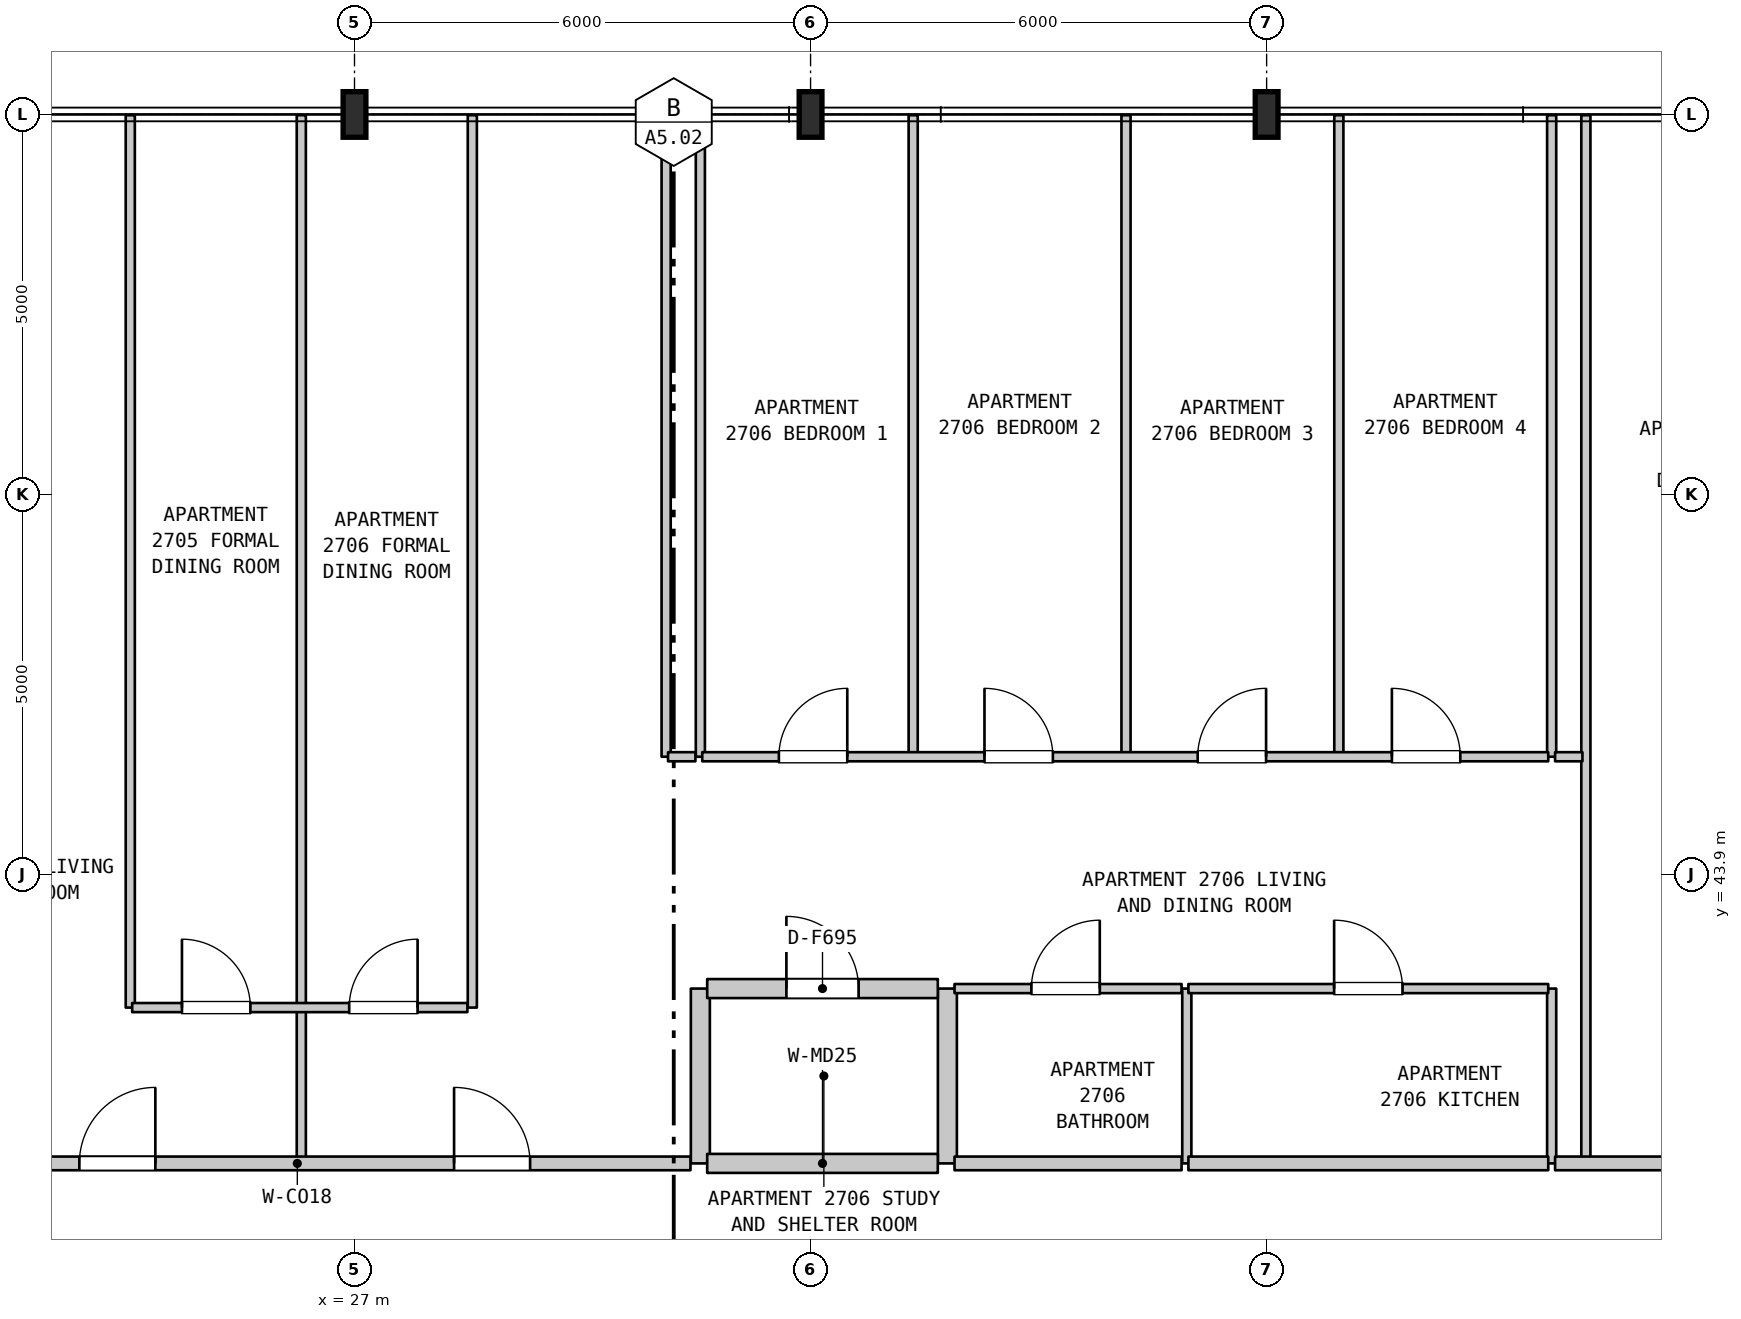
"""IFC4 building model, lengths in metres.
Left out: names, types, materials, properties, quantities, classifications, styles, units other than length and angle.
Written with IfcOpenShell. Run it as: python <this file> out.ifc"""

import sys

from ifc_helpers import new_model, si_unit, direction, frame, frame_2d, origin, origin_2d, place, context, subcontext, project, spatial, rectangle, i_section, extrude, element, fill, save


model = new_model("IFC4")
c1 = context("Model", 3, precision=1e-05, world=origin(), true_north=direction((0.0, 1.0)))
c2 = subcontext(c1, "Body", "Model", "MODEL_VIEW")
j1 = project(units=[si_unit("LENGTHUNIT", "METRE"), si_unit("PLANEANGLEUNIT", "RADIAN")], contexts=[c1])
p1 = place(None, origin())
s1 = spatial("IfcSite", under=j1, at=p1, CompositionType="ELEMENT")
p2 = place(p1, origin())
s2 = spatial("IfcBuilding", under=s1, at=p2, CompositionType="ELEMENT")
p3 = place(p2, frame((0.0, 0.0, 113.1)))
s3 = spatial("IfcBuildingStorey", under=s2, at=p3, CompositionType="ELEMENT", Elevation=113.1)
for number, where, z_axis, x_axis in (
    (1, (27.0, 53.9, 0.0), (0.0, 0.0, 1.0), (1.0, 0.0, 0.0)),
    (2, (33.0, 53.9, 0.0), (0.0, 0.0, 1.0), (1.0, 0.0, 0.0)),
    (3, (39.0, 53.9, 0.0), (0.0, 0.0, 1.0), (1.0, 0.0, 0.0)),
):
    element("IfcColumn", number, at=place(p3, frame(where, z_axis=z_axis, x_axis=x_axis)), inside=s3, PredefinedType="COLUMN", context=c2, shape_type="SweptSolid", body=[
        extrude(i_section(OverallWidth=0.3, OverallDepth=0.6, WebThickness=0.015, FlangeThickness=0.03, FilletRadius=0.027, at=origin_2d()), origin(), (0.0, 0.0, 1.0), 3.7),
    ])
p4 = place(p3, frame((24.05, 42.15, 0.0), z_axis=(0.0, 0.0, 1.0), x_axis=(0.0, 1.0, 0.0)))
e4 = element("IfcWall", 4, at=p4, inside=s3, PredefinedType="PARTITIONING", context=c2, shape_type="SweptSolid", body=[
    extrude(rectangle(XDim=11.74, YDim=0.12, at=frame_2d((5.87, 0.0))), origin(), (0.0, 0.0, 1.0), 3.385),
])
p5 = place(p3, frame((26.3, 40.1, 0.0), z_axis=(0.0, 0.0, 1.0), x_axis=(0.0, 1.0, 0.0)))
e5 = element("IfcWall", 5, at=p5, inside=s3, PredefinedType="PARTITIONING", context=c2, shape_type="SweptSolid", body=[
    extrude(rectangle(XDim=2.05, YDim=0.12, at=frame_2d((1.025, 0.0))), origin(), (0.0, 0.0, 1.0), 3.385),
])
for number, where, z_axis, x_axis in (
    (6, (26.3, 42.15, 0.0), (0.0, 0.0, 1.0), (0.0, 1.0, 0.0)),
    (7, (28.55, 42.15, 0.0), (0.0, 0.0, 1.0), (0.0, 1.0, 0.0)),
):
    element("IfcWall", number, at=place(p3, frame(where, z_axis=z_axis, x_axis=x_axis)), inside=s3, PredefinedType="PARTITIONING", context=c2, shape_type="SweptSolid", body=[
        extrude(rectangle(XDim=11.74, YDim=0.12, at=frame_2d((5.87, 0.0))), origin(), (0.0, 0.0, 1.0), 3.385),
    ])
p6 = place(p3, frame((31.1, 45.45, 0.0), z_axis=(0.0, 0.0, 1.0), x_axis=(0.0, 1.0, 0.0)))
e8 = element("IfcWall", 8, at=p6, inside=s3, PredefinedType="PARTITIONING", context=c2, shape_type="SweptSolid", body=[
    extrude(rectangle(XDim=8.44, YDim=0.12, at=frame_2d((4.22, 0.0))), origin(), (0.0, 0.0, 1.0), 3.385),
])
p7 = place(p3, frame((31.55, 40.1, 0.0), z_axis=(0.0, 0.0, 1.0), x_axis=(0.0, 1.0, 0.0)))
e9 = element("IfcWall", 9, at=p7, inside=s3, PredefinedType="STANDARD", context=c2, shape_type="SweptSolid", body=[
    extrude(rectangle(XDim=2.3, YDim=0.25, at=frame_2d((1.15, 0.0))), origin(), (0.0, 0.0, 1.0), 3.385),
])
for number, where, z_axis, x_axis in (
    (10, (31.55, 45.45, 0.0), (0.0, 0.0, 1.0), (0.0, 1.0, 0.0)),
    (11, (34.35, 45.45, 0.0), (0.0, 0.0, 1.0), (0.0, 1.0, 0.0)),
):
    element("IfcWall", number, at=place(p3, frame(where, z_axis=z_axis, x_axis=x_axis)), inside=s3, PredefinedType="PARTITIONING", context=c2, shape_type="SweptSolid", body=[
        extrude(rectangle(XDim=8.44, YDim=0.12, at=frame_2d((4.22, 0.0))), origin(), (0.0, 0.0, 1.0), 3.385),
    ])
p8 = place(p3, frame((34.8, 40.1, 0.0), z_axis=(0.0, 0.0, 1.0), x_axis=(0.0, 1.0, 0.0)))
e12 = element("IfcWall", 12, at=p8, inside=s3, PredefinedType="STANDARD", context=c2, shape_type="SweptSolid", body=[
    extrude(rectangle(XDim=2.3, YDim=0.25, at=frame_2d((1.15, 0.0))), origin(), (0.0, 0.0, 1.0), 3.385),
])
p9 = place(p3, frame((37.15, 45.45, 0.0), z_axis=(0.0, 0.0, 1.0), x_axis=(0.0, 1.0, 0.0)))
e13 = element("IfcWall", 13, at=p9, inside=s3, PredefinedType="PARTITIONING", context=c2, shape_type="SweptSolid", body=[
    extrude(rectangle(XDim=8.44, YDim=0.12, at=frame_2d((4.22, 0.0))), origin(), (0.0, 0.0, 1.0), 3.385),
])
p10 = place(p3, frame((37.95, 40.1, 0.0), z_axis=(0.0, 0.0, 1.0), x_axis=(0.0, 1.0, 0.0)))
e14 = element("IfcWall", 14, at=p10, inside=s3, PredefinedType="PARTITIONING", context=c2, shape_type="SweptSolid", body=[
    extrude(rectangle(XDim=2.3, YDim=0.12, at=frame_2d((1.15, 0.0))), origin(), (0.0, 0.0, 1.0), 3.385),
])
p11 = place(p3, frame((39.95, 45.45, 0.0), z_axis=(0.0, 0.0, 1.0), x_axis=(0.0, 1.0, 0.0)))
e15 = element("IfcWall", 15, at=p11, inside=s3, PredefinedType="PARTITIONING", context=c2, shape_type="SweptSolid", body=[
    extrude(rectangle(XDim=8.44, YDim=0.12, at=frame_2d((4.22, 0.0))), origin(), (0.0, 0.0, 1.0), 3.385),
])
p12 = place(p3, frame((42.75, 40.1, 0.0), z_axis=(0.0, 0.0, 1.0), x_axis=(0.0, 1.0, 0.0)))
e16 = element("IfcWall", 16, at=p12, inside=s3, PredefinedType="PARTITIONING", context=c2, shape_type="SweptSolid", body=[
    extrude(rectangle(XDim=2.3, YDim=0.12, at=frame_2d((1.15, 0.0))), origin(), (0.0, 0.0, 1.0), 3.385),
])
p13 = place(p3, frame((42.75, 45.45, 0.0), z_axis=(0.0, 0.0, 1.0), x_axis=(0.0, 1.0, 0.0)))
e17 = element("IfcWall", 17, at=p13, inside=s3, PredefinedType="PARTITIONING", context=c2, shape_type="SweptSolid", body=[
    extrude(rectangle(XDim=8.44, YDim=0.12, at=frame_2d((4.22, 0.0))), origin(), (0.0, 0.0, 1.0), 3.385),
])
p14 = place(p3, frame((43.2, 40.1, 0.0), z_axis=(0.0, 0.0, 1.0), x_axis=(0.0, 1.0, 0.0)))
e18 = element("IfcWall", 18, at=p14, inside=s3, PredefinedType="PARTITIONING", context=c2, shape_type="SweptSolid", body=[
    extrude(rectangle(XDim=13.79, YDim=0.12, at=frame_2d((6.895, 0.0))), origin(), (0.0, 0.0, 1.0), 3.385),
])
p15 = place(p3, frame((21.075, 40.1, 0.0), z_axis=(0.0, 0.0, 1.0), x_axis=(1.0, 0.0, 0.0)))
e19 = element("IfcWall", 19, at=p15, inside=s3, PredefinedType="STANDARD", context=c2, shape_type="SweptSolid", body=[
    extrude(rectangle(XDim=10.345, YDim=0.18, at=frame_2d((5.172, 0.0))), origin(), (0.0, 0.0, 1.0), 3.385),
])
p16 = place(p15, frame((2.305, 0.0, 0.0)))
e20 = element("IfcOpeningElement", 20, at=p16, cuts=e19, PredefinedType="OPENING", context=c2, shape_type="SweptSolid", body=[
    extrude(rectangle(XDim=1.0, YDim=2.15, at=frame_2d((0.5, 1.075))), frame((0.0, 0.1, 0.0), z_axis=(0.0, -1.0, 0.0), x_axis=(1.0, 0.0, 0.0)), (0.0, 0.0, 1.0), 0.2),
])
p17 = place(p15, frame((7.235, 0.0, 0.0)))
e21 = element("IfcOpeningElement", 21, at=p17, cuts=e19, PredefinedType="OPENING", context=c2, shape_type="SweptSolid", body=[
    extrude(rectangle(XDim=1.0, YDim=2.15, at=frame_2d((0.5, 1.075))), frame((0.0, 0.1, 0.0), z_axis=(0.0, -1.0, 0.0), x_axis=(1.0, 0.0, 0.0)), (0.0, 0.0, 1.0), 0.2),
])
p18 = place(p3, frame((31.64, 40.1, 0.0), z_axis=(0.0, 0.0, 1.0), x_axis=(1.0, 0.0, 0.0)))
e22 = element("IfcWall", 22, at=p18, inside=s3, PredefinedType="STANDARD", context=c2, shape_type="SweptSolid", body=[
    extrude(rectangle(XDim=3.034, YDim=0.25, at=frame_2d((1.517, 0.0))), origin(), (0.0, 0.0, 1.0), 3.385),
])
p19 = place(p3, frame((34.894, 40.1, 0.0), z_axis=(0.0, 0.0, 1.0), x_axis=(1.0, 0.0, 0.0)))
e23 = element("IfcWall", 23, at=p19, inside=s3, PredefinedType="STANDARD", context=c2, shape_type="SweptSolid", body=[
    extrude(rectangle(XDim=2.987, YDim=0.18, at=frame_2d((1.494, 0.0))), origin(), (0.0, 0.0, 1.0), 3.385),
])
p20 = place(p3, frame((37.971, 40.1, 0.0), z_axis=(0.0, 0.0, 1.0), x_axis=(1.0, 0.0, 0.0)))
e24 = element("IfcWall", 24, at=p20, inside=s3, PredefinedType="STANDARD", context=c2, shape_type="SweptSolid", body=[
    extrude(rectangle(XDim=4.734, YDim=0.18, at=frame_2d((2.367, 0.0))), origin(), (0.0, 0.0, 1.0), 3.385),
])
p21 = place(p3, frame((42.795, 40.1, 0.0), z_axis=(0.0, 0.0, 1.0), x_axis=(1.0, 0.0, 0.0)))
e25 = element("IfcWall", 25, at=p21, inside=s3, PredefinedType="STANDARD", context=c2, shape_type="SweptSolid", body=[
    extrude(rectangle(XDim=3.96, YDim=0.18, at=frame_2d((1.98, 0.0))), origin(), (0.0, 0.0, 1.0), 3.385),
])
p22 = place(p21, frame((1.609, 0.0, 0.0)))
e26 = element("IfcOpeningElement", 26, at=p22, cuts=e25, PredefinedType="OPENING", context=c2, shape_type="SweptSolid", body=[
    extrude(rectangle(XDim=1.0, YDim=2.15, at=frame_2d((0.5, 1.075))), frame((0.0, 0.1, 0.0), z_axis=(0.0, -1.0, 0.0), x_axis=(1.0, 0.0, 0.0)), (0.0, 0.0, 1.0), 0.2),
])
p23 = place(p3, frame((24.075, 42.15, 0.0), z_axis=(0.0, 0.0, 1.0), x_axis=(1.0, 0.0, 0.0)))
e27 = element("IfcWall", 27, at=p23, inside=s3, PredefinedType="PARTITIONING", context=c2, shape_type="SweptSolid", body=[
    extrude(rectangle(XDim=4.41, YDim=0.12, at=frame_2d((2.205, 0.0))), origin(), (0.0, 0.0, 1.0), 3.385),
])
p24 = place(p23, frame((0.655, 0.0, 0.0)))
e28 = element("IfcOpeningElement", 28, at=p24, cuts=e27, PredefinedType="OPENING", context=c2, shape_type="SweptSolid", body=[
    extrude(rectangle(XDim=0.9, YDim=2.15, at=frame_2d((0.45, 1.075))), frame((0.0, 0.07, 0.0), z_axis=(0.0, -1.0, 0.0), x_axis=(1.0, 0.0, 0.0)), (0.0, 0.0, 1.0), 0.14),
])
p25 = place(p23, frame((2.855, 0.0, 0.0)))
e29 = element("IfcOpeningElement", 29, at=p25, cuts=e27, PredefinedType="OPENING", context=c2, shape_type="SweptSolid", body=[
    extrude(rectangle(XDim=0.9, YDim=2.15, at=frame_2d((0.45, 1.075))), frame((0.0, 0.07, 0.0), z_axis=(0.0, -1.0, 0.0), x_axis=(1.0, 0.0, 0.0)), (0.0, 0.0, 1.0), 0.14),
])
p26 = place(p3, frame((31.64, 42.4, 0.0), z_axis=(0.0, 0.0, 1.0), x_axis=(1.0, 0.0, 0.0)))
e30 = element("IfcWall", 30, at=p26, inside=s3, PredefinedType="STANDARD", context=c2, shape_type="SweptSolid", body=[
    extrude(rectangle(XDim=3.034, YDim=0.25, at=frame_2d((1.517, 0.0))), origin(), (0.0, 0.0, 1.0), 3.385),
])
p27 = place(p26, frame((1.042, 0.0, 0.0)))
e31 = element("IfcOpeningElement", 31, at=p27, cuts=e30, PredefinedType="OPENING", context=c2, shape_type="SweptSolid", body=[
    extrude(rectangle(XDim=0.95, YDim=2.15, at=frame_2d((0.475, 1.075))), frame((0.0, 0.135, 0.0), z_axis=(0.0, -1.0, 0.0), x_axis=(1.0, 0.0, 0.0)), (0.0, 0.0, 1.0), 0.27),
])
p28 = place(p3, frame((34.894, 42.4, 0.0), z_axis=(0.0, 0.0, 1.0), x_axis=(1.0, 0.0, 0.0)))
e32 = element("IfcWall", 32, at=p28, inside=s3, PredefinedType="PARTITIONING", context=c2, shape_type="SweptSolid", body=[
    extrude(rectangle(XDim=2.987, YDim=0.12, at=frame_2d((1.494, 0.0))), origin(), (0.0, 0.0, 1.0), 3.385),
])
p29 = place(p28, frame((1.011, 0.0, 0.0)))
e33 = element("IfcOpeningElement", 33, at=p29, cuts=e32, PredefinedType="OPENING", context=c2, shape_type="SweptSolid", body=[
    extrude(rectangle(XDim=0.9, YDim=2.1, at=frame_2d((0.45, 1.05))), frame((0.0, 0.07, 0.0), z_axis=(0.0, -1.0, 0.0), x_axis=(1.0, 0.0, 0.0)), (0.0, 0.0, 1.0), 0.14),
])
p30 = place(p3, frame((37.971, 42.4, 0.0), z_axis=(0.0, 0.0, 1.0), x_axis=(1.0, 0.0, 0.0)))
e34 = element("IfcWall", 34, at=p30, inside=s3, PredefinedType="PARTITIONING", context=c2, shape_type="SweptSolid", body=[
    extrude(rectangle(XDim=4.734, YDim=0.12, at=frame_2d((2.367, 0.0))), origin(), (0.0, 0.0, 1.0), 3.385),
])
p31 = place(p30, frame((1.917, 0.0, 0.0)))
e35 = element("IfcOpeningElement", 35, at=p31, cuts=e34, PredefinedType="OPENING", context=c2, shape_type="SweptSolid", body=[
    extrude(rectangle(XDim=0.9, YDim=2.15, at=frame_2d((0.45, 1.075))), frame((0.0, 0.07, 0.0), z_axis=(0.0, -1.0, 0.0), x_axis=(1.0, 0.0, 0.0)), (0.0, 0.0, 1.0), 0.14),
])
p32 = place(p3, frame((31.125, 45.45, 0.0), z_axis=(0.0, 0.0, 1.0), x_axis=(1.0, 0.0, 0.0)))
e36 = element("IfcWall", 36, at=p32, inside=s3, PredefinedType="PARTITIONING", context=c2, shape_type="SweptSolid", body=[
    extrude(rectangle(XDim=0.36, YDim=0.12, at=frame_2d((0.18, 0.0))), origin(), (0.0, 0.0, 1.0), 3.385),
])
p33 = place(p3, frame((31.575, 45.45, 0.0), z_axis=(0.0, 0.0, 1.0), x_axis=(1.0, 0.0, 0.0)))
e37 = element("IfcWall", 37, at=p33, inside=s3, PredefinedType="PARTITIONING", context=c2, shape_type="SweptSolid", body=[
    extrude(rectangle(XDim=11.13, YDim=0.12, at=frame_2d((5.565, 0.0))), origin(), (0.0, 0.0, 1.0), 3.385),
])
p34 = place(p33, frame((1.008, 0.0, 0.0)))
e38 = element("IfcOpeningElement", 38, at=p34, cuts=e37, PredefinedType="OPENING", context=c2, shape_type="SweptSolid", body=[
    extrude(rectangle(XDim=0.9, YDim=2.15, at=frame_2d((0.45, 1.075))), frame((0.0, 0.07, 0.0), z_axis=(0.0, -1.0, 0.0), x_axis=(1.0, 0.0, 0.0)), (0.0, 0.0, 1.0), 0.14),
])
p35 = place(p33, frame((3.713, 0.0, 0.0)))
e39 = element("IfcOpeningElement", 39, at=p35, cuts=e37, PredefinedType="OPENING", context=c2, shape_type="SweptSolid", body=[
    extrude(rectangle(XDim=0.9, YDim=2.15, at=frame_2d((0.45, 1.075))), frame((0.0, 0.07, 0.0), z_axis=(0.0, -1.0, 0.0), x_axis=(1.0, 0.0, 0.0)), (0.0, 0.0, 1.0), 0.14),
])
p36 = place(p33, frame((6.518, 0.0, 0.0)))
e40 = element("IfcOpeningElement", 40, at=p36, cuts=e37, PredefinedType="OPENING", context=c2, shape_type="SweptSolid", body=[
    extrude(rectangle(XDim=0.9, YDim=2.15, at=frame_2d((0.45, 1.075))), frame((0.0, 0.07, 0.0), z_axis=(0.0, -1.0, 0.0), x_axis=(1.0, 0.0, 0.0)), (0.0, 0.0, 1.0), 0.14),
])
p37 = place(p33, frame((9.073, 0.0, 0.0)))
e41 = element("IfcOpeningElement", 41, at=p37, cuts=e37, PredefinedType="OPENING", context=c2, shape_type="SweptSolid", body=[
    extrude(rectangle(XDim=0.9, YDim=2.15, at=frame_2d((0.45, 1.075))), frame((0.0, 0.07, 0.0), z_axis=(0.0, -1.0, 0.0), x_axis=(1.0, 0.0, 0.0)), (0.0, 0.0, 1.0), 0.14),
])
p38 = place(p3, frame((42.795, 45.45, 0.0), z_axis=(0.0, 0.0, 1.0), x_axis=(1.0, 0.0, 0.0)))
e42 = element("IfcWall", 42, at=p38, inside=s3, PredefinedType="PARTITIONING", context=c2, shape_type="SweptSolid", body=[
    extrude(rectangle(XDim=0.36, YDim=0.12, at=frame_2d((0.18, 0.0))), origin(), (0.0, 0.0, 1.0), 3.385),
])
p39 = place(p16, origin())
e43 = element("IfcDoor", 43, at=p39, inside=s3, OperationType="SINGLE_SWING_RIGHT", PredefinedType="DOOR", context=c2, shape_type="SweptSolid", body=[
    extrude(rectangle(XDim=1.0, YDim=2.15, at=frame_2d((0.5, 1.075))), frame((0.0, 0.025, 0.0), z_axis=(0.0, -1.0, 0.0), x_axis=(1.0, 0.0, 0.0)), (0.0, 0.0, 1.0), 0.05),
])
fill(e20, e43)
p40 = place(p17, origin())
e44 = element("IfcDoor", 44, at=p40, inside=s3, OperationType="SINGLE_SWING_LEFT", PredefinedType="DOOR", context=c2, shape_type="SweptSolid", body=[
    extrude(rectangle(XDim=1.0, YDim=2.15, at=frame_2d((0.5, 1.075))), frame((0.0, 0.025, 0.0), z_axis=(0.0, -1.0, 0.0), x_axis=(1.0, 0.0, 0.0)), (0.0, 0.0, 1.0), 0.05),
])
fill(e21, e44)
p41 = place(p24, origin())
e45 = element("IfcDoor", 45, at=p41, inside=s3, OperationType="SINGLE_SWING_LEFT", PredefinedType="DOOR", context=c2, shape_type="SweptSolid", body=[
    extrude(rectangle(XDim=0.9, YDim=2.15, at=frame_2d((0.45, 1.075))), frame((0.0, 0.025, 0.0), z_axis=(0.0, -1.0, 0.0), x_axis=(1.0, 0.0, 0.0)), (0.0, 0.0, 1.0), 0.05),
])
fill(e28, e45)
p42 = place(p25, origin())
e46 = element("IfcDoor", 46, at=p42, inside=s3, OperationType="SINGLE_SWING_RIGHT", PredefinedType="DOOR", context=c2, shape_type="SweptSolid", body=[
    extrude(rectangle(XDim=0.9, YDim=2.15, at=frame_2d((0.45, 1.075))), frame((0.0, 0.025, 0.0), z_axis=(0.0, -1.0, 0.0), x_axis=(1.0, 0.0, 0.0)), (0.0, 0.0, 1.0), 0.05),
])
fill(e29, e46)
p43 = place(p27, origin())
e47 = element("IfcDoor", 47, at=p43, inside=s3, OperationType="SINGLE_SWING_LEFT", PredefinedType="DOOR", context=c2, shape_type="SweptSolid", body=[
    extrude(rectangle(XDim=0.95, YDim=2.15, at=frame_2d((0.475, 1.075))), frame((0.0, 0.025, 0.0), z_axis=(0.0, -1.0, 0.0), x_axis=(1.0, 0.0, 0.0)), (0.0, 0.0, 1.0), 0.05),
])
fill(e31, e47)
p44 = place(p29, origin())
e48 = element("IfcDoor", 48, at=p44, inside=s3, OperationType="SINGLE_SWING_RIGHT", PredefinedType="DOOR", context=c2, shape_type="SweptSolid", body=[
    extrude(rectangle(XDim=0.9, YDim=2.1, at=frame_2d((0.45, 1.05))), frame((0.0, 0.025, 0.0), z_axis=(0.0, -1.0, 0.0), x_axis=(1.0, 0.0, 0.0)), (0.0, 0.0, 1.0), 0.05),
])
fill(e33, e48)
p45 = place(p31, origin())
e49 = element("IfcDoor", 49, at=p45, inside=s3, OperationType="SINGLE_SWING_LEFT", PredefinedType="DOOR", context=c2, shape_type="SweptSolid", body=[
    extrude(rectangle(XDim=0.9, YDim=2.15, at=frame_2d((0.45, 1.075))), frame((0.0, 0.025, 0.0), z_axis=(0.0, -1.0, 0.0), x_axis=(1.0, 0.0, 0.0)), (0.0, 0.0, 1.0), 0.05),
])
fill(e35, e49)
p46 = place(p34, origin())
e50 = element("IfcDoor", 50, at=p46, inside=s3, OperationType="SINGLE_SWING_RIGHT", PredefinedType="DOOR", context=c2, shape_type="SweptSolid", body=[
    extrude(rectangle(XDim=0.9, YDim=2.15, at=frame_2d((0.45, 1.075))), frame((0.0, 0.025, 0.0), z_axis=(0.0, -1.0, 0.0), x_axis=(1.0, 0.0, 0.0)), (0.0, 0.0, 1.0), 0.05),
])
fill(e38, e50)
p47 = place(p35, origin())
e51 = element("IfcDoor", 51, at=p47, inside=s3, OperationType="SINGLE_SWING_LEFT", PredefinedType="DOOR", context=c2, shape_type="SweptSolid", body=[
    extrude(rectangle(XDim=0.9, YDim=2.15, at=frame_2d((0.45, 1.075))), frame((0.0, 0.025, 0.0), z_axis=(0.0, -1.0, 0.0), x_axis=(1.0, 0.0, 0.0)), (0.0, 0.0, 1.0), 0.05),
])
fill(e39, e51)
p48 = place(p36, origin())
e52 = element("IfcDoor", 52, at=p48, inside=s3, OperationType="SINGLE_SWING_RIGHT", PredefinedType="DOOR", context=c2, shape_type="SweptSolid", body=[
    extrude(rectangle(XDim=0.9, YDim=2.15, at=frame_2d((0.45, 1.075))), frame((0.0, 0.025, 0.0), z_axis=(0.0, -1.0, 0.0), x_axis=(1.0, 0.0, 0.0)), (0.0, 0.0, 1.0), 0.05),
])
fill(e40, e52)
p49 = place(p37, origin())
e53 = element("IfcDoor", 53, at=p49, inside=s3, OperationType="SINGLE_SWING_LEFT", PredefinedType="DOOR", context=c2, shape_type="SweptSolid", body=[
    extrude(rectangle(XDim=0.9, YDim=2.15, at=frame_2d((0.45, 1.075))), frame((0.0, 0.025, 0.0), z_axis=(0.0, -1.0, 0.0), x_axis=(1.0, 0.0, 0.0)), (0.0, 0.0, 1.0), 0.05),
])
fill(e41, e53)
save(model, sys.argv[1])
